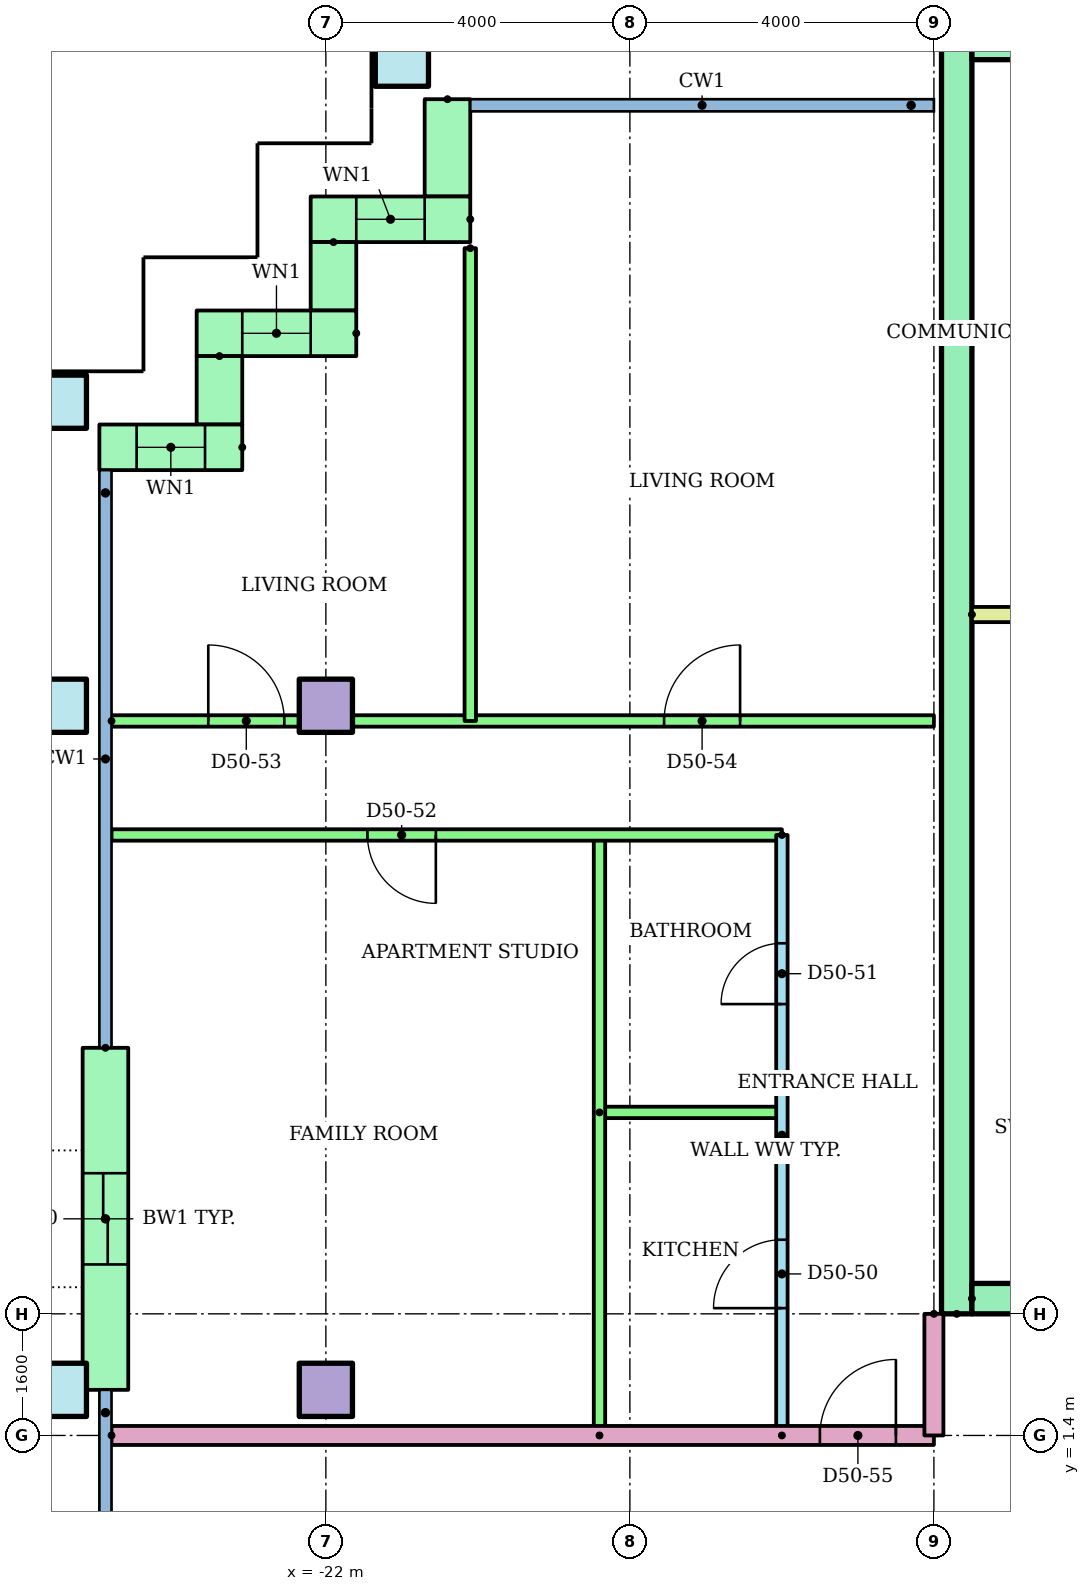
"""IFC4 building model, lengths in metres.
Left out: names, types, materials, properties, quantities, classifications, styles, units other than length and angle.
Written with IfcOpenShell. Run it as: python <this file> out.ifc"""

import sys

from ifc_helpers import new_model, si_unit, direction, frame, frame_2d, origin, origin_2d, place, context, subcontext, project, spatial, rectangle, hollow_rectangle, extrude, element, fill, save


model = new_model("IFC4")
c1 = context("Model", 3, precision=1e-05, world=origin(), true_north=direction((0.0, 1.0)))
c2 = subcontext(c1, "Body", "Model", "MODEL_VIEW")
j1 = project(units=[si_unit("LENGTHUNIT", "METRE"), si_unit("PLANEANGLEUNIT", "RADIAN")], contexts=[c1])
p1 = place(None, origin())
s1 = spatial("IfcSite", under=j1, at=p1, CompositionType="ELEMENT")
p2 = place(p1, origin())
s2 = spatial("IfcBuilding", under=s1, at=p2, CompositionType="ELEMENT")
p3 = place(p2, frame((0.0, 0.0, 190.9)))
s3 = spatial("IfcBuildingStorey", under=s2, at=p3, CompositionType="ELEMENT", Elevation=190.9)
p4 = place(p3, frame((-25.5, 2.0, 0.0)))
e1 = element("IfcColumn", 1, at=p4, inside=s3, PredefinedType="COLUMN", context=c2, shape_type="SweptSolid", body=[
    extrude(hollow_rectangle(XDim=0.7, YDim=0.7, WallThickness=0.036, at=origin_2d()), origin(), (0.0, 0.0, 1.0), 3.2),
])
p5 = place(p3, frame((-22.0, 2.0, 0.0)))
e2 = element("IfcColumn", 2, at=p5, inside=s3, PredefinedType="COLUMN", context=c2, shape_type="SweptSolid", body=[
    extrude(rectangle(XDim=0.7, YDim=0.7, at=origin_2d()), origin(), (0.0, 0.0, 1.0), 3.2),
])
p6 = place(p3, frame((-25.5, 11.0, 0.0)))
e3 = element("IfcColumn", 3, at=p6, inside=s3, PredefinedType="COLUMN", context=c2, shape_type="SweptSolid", body=[
    extrude(hollow_rectangle(XDim=0.7, YDim=0.7, WallThickness=0.036, at=origin_2d()), origin(), (0.0, 0.0, 1.0), 3.2),
])
p7 = place(p3, frame((-22.0, 11.0, 0.0)))
e4 = element("IfcColumn", 4, at=p7, inside=s3, PredefinedType="COLUMN", context=c2, shape_type="SweptSolid", body=[
    extrude(rectangle(XDim=0.7, YDim=0.7, at=origin_2d()), origin(), (0.0, 0.0, 1.0), 3.2),
])
for number, where in (
    (5, (-25.5, 15.0, 0.0)),
    (6, (-21.0, 19.5, 0.0)),
):
    element("IfcColumn", number, at=place(p3, frame(where)), inside=s3, PredefinedType="COLUMN", context=c2, shape_type="SweptSolid", body=[
        extrude(hollow_rectangle(XDim=0.7, YDim=0.7, WallThickness=0.036, at=origin_2d()), origin(), (0.0, 0.0, 1.0), 3.2),
    ])
p8 = place(p3, frame((-20.4, 18.98, 0.0), z_axis=(0.0, 0.0, 1.0), x_axis=(0.0, -1.0, 0.0)))
e7 = element("IfcWall", 7, at=p8, inside=s3, PredefinedType="STANDARD", context=c2, shape_type="SweptSolid", body=[
    extrude(rectangle(XDim=1.28, YDim=0.6, at=frame_2d((0.64, 0.0))), origin(), (0.0, 0.0, 1.0), 2.8),
])
p9 = place(p3, frame((-20.1, 17.4, 0.0), z_axis=(0.0, 0.0, 1.0), x_axis=(-1.0, 0.0, 0.0)))
e8 = element("IfcWall", 8, at=p9, inside=s3, PredefinedType="STANDARD", context=c2, shape_type="SweptSolid", body=[
    extrude(rectangle(XDim=2.1, YDim=0.6, at=frame_2d((1.05, 0.0))), origin(), (0.0, 0.0, 1.0), 2.8),
])
p10 = place(p9, frame((0.6, 0.0, 0.9)))
e9 = element("IfcOpeningElement", 9, at=p10, cuts=e8, PredefinedType="OPENING", context=c2, shape_type="SweptSolid", body=[
    extrude(rectangle(XDim=0.9, YDim=1.5, at=frame_2d((0.45, 0.75))), frame((0.0, 0.31, 0.0), z_axis=(0.0, -1.0, 0.0), x_axis=(1.0, 0.0, 0.0)), (0.0, 0.0, 1.0), 0.62),
])
p11 = place(p3, frame((-21.9, 17.1, 0.0), z_axis=(0.0, 0.0, 1.0), x_axis=(0.0, -1.0, 0.0)))
e10 = element("IfcWall", 10, at=p11, inside=s3, PredefinedType="STANDARD", context=c2, shape_type="SweptSolid", body=[
    extrude(rectangle(XDim=0.9, YDim=0.6, at=frame_2d((0.45, 0.0))), origin(), (0.0, 0.0, 1.0), 2.8),
])
p12 = place(p3, frame((-21.6, 15.9, 0.0), z_axis=(0.0, 0.0, 1.0), x_axis=(-1.0, 0.0, 0.0)))
e11 = element("IfcWall", 11, at=p12, inside=s3, PredefinedType="STANDARD", context=c2, shape_type="SweptSolid", body=[
    extrude(rectangle(XDim=2.1, YDim=0.6, at=frame_2d((1.05, 0.0))), origin(), (0.0, 0.0, 1.0), 2.8),
])
p13 = place(p12, frame((0.6, 0.0, 0.9)))
e12 = element("IfcOpeningElement", 12, at=p13, cuts=e11, PredefinedType="OPENING", context=c2, shape_type="SweptSolid", body=[
    extrude(rectangle(XDim=0.9, YDim=1.5, at=frame_2d((0.45, 0.75))), frame((0.0, 0.31, 0.0), z_axis=(0.0, -1.0, 0.0), x_axis=(1.0, 0.0, 0.0)), (0.0, 0.0, 1.0), 0.62),
])
p14 = place(p3, frame((-23.4, 15.6, 0.0), z_axis=(0.0, 0.0, 1.0), x_axis=(0.0, -1.0, 0.0)))
e13 = element("IfcWall", 13, at=p14, inside=s3, PredefinedType="STANDARD", context=c2, shape_type="SweptSolid", body=[
    extrude(rectangle(XDim=0.9, YDim=0.6, at=frame_2d((0.45, 0.0))), origin(), (0.0, 0.0, 1.0), 2.8),
])
p15 = place(p3, frame((-23.1, 14.4, 0.0), z_axis=(0.0, 0.0, 1.0), x_axis=(-1.0, 0.0, 0.0)))
e14 = element("IfcWall", 14, at=p15, inside=s3, PredefinedType="STANDARD", context=c2, shape_type="SweptSolid", body=[
    extrude(rectangle(XDim=1.88, YDim=0.6, at=frame_2d((0.94, 0.0))), origin(), (0.0, 0.0, 1.0), 2.8),
])
p16 = place(p15, frame((0.49, 0.0, 0.9)))
e15 = element("IfcOpeningElement", 15, at=p16, cuts=e14, PredefinedType="OPENING", context=c2, shape_type="SweptSolid", body=[
    extrude(rectangle(XDim=0.9, YDim=1.5, at=frame_2d((0.45, 0.75))), frame((0.0, 0.31, 0.0), z_axis=(0.0, -1.0, 0.0), x_axis=(1.0, 0.0, 0.0)), (0.0, 0.0, 1.0), 0.62),
])
p17 = place(p3, frame((-24.9, 6.5, 0.0), z_axis=(0.0, 0.0, 1.0), x_axis=(0.0, -1.0, 0.0)))
e16 = element("IfcWall", 16, at=p17, inside=s3, PredefinedType="STANDARD", context=c2, shape_type="SweptSolid", body=[
    extrude(rectangle(XDim=4.5, YDim=0.6, at=frame_2d((2.25, 0.0))), origin(), (0.0, 0.0, 1.0), 2.8),
])
p18 = place(p17, frame((1.65, 0.0, 0.0)))
e17 = element("IfcOpeningElement", 17, at=p18, cuts=e16, PredefinedType="OPENING", context=c2, shape_type="SweptSolid", body=[
    extrude(rectangle(XDim=1.2, YDim=2.1, at=frame_2d((0.6, 1.05))), frame((0.0, 0.31, 0.0), z_axis=(0.0, -1.0, 0.0), x_axis=(1.0, 0.0, 0.0)), (0.0, 0.0, 1.0), 0.62),
])
p19 = place(p3, frame((-13.7, 3.0, 0.0), z_axis=(0.0, 0.0, 1.0), x_axis=(0.0, 1.0, 0.0)))
e18 = element("IfcWall", 18, at=p19, inside=s3, PredefinedType="SHEAR", context=c2, shape_type="SweptSolid", body=[
    extrude(rectangle(XDim=17.0, YDim=0.4, at=frame_2d((8.5, 0.0))), origin(), (0.0, 0.0, 1.0), 2.8),
])
p20 = place(p3, frame((-13.5, 19.7, 0.0)))
e19 = element("IfcWall", 19, at=p20, inside=s3, PredefinedType="SHEAR", context=c2, shape_type="SweptSolid", body=[
    extrude(rectangle(XDim=27.0, YDim=0.4, at=frame_2d((13.5, 0.0))), origin(), (0.0, 0.0, 1.0), 2.8),
])
p21 = place(p3, frame((-13.5, 3.2, 0.0)))
e20 = element("IfcWall", 20, at=p21, inside=s3, PredefinedType="SHEAR", context=c2, shape_type="SweptSolid", body=[
    extrude(rectangle(XDim=27.0, YDim=0.4, at=frame_2d((13.5, 0.0))), origin(), (0.0, 0.0, 1.0), 2.8),
])
p22 = place(p21, frame((22.083, 0.0, 0.0)))
e21 = element("IfcOpeningElement", 21, at=p22, cuts=e20, PredefinedType="OPENING", context=c2, shape_type="SweptSolid", body=[
    extrude(rectangle(XDim=1.1, YDim=2.1, at=frame_2d((0.55, 1.05))), frame((0.0, 0.21, 0.0), z_axis=(0.0, -1.0, 0.0), x_axis=(1.0, 0.0, 0.0)), (0.0, 0.0, 1.0), 0.42),
])
p23 = place(p21, frame((25.128, 0.0, 0.0)))
e22 = element("IfcOpeningElement", 22, at=p23, cuts=e20, PredefinedType="OPENING", context=c2, shape_type="SweptSolid", body=[
    extrude(rectangle(XDim=1.1, YDim=2.1, at=frame_2d((0.55, 1.05))), frame((0.0, 0.21, 0.0), z_axis=(0.0, -1.0, 0.0), x_axis=(1.0, 0.0, 0.0)), (0.0, 0.0, 1.0), 0.42),
])
p24 = place(p21, frame((12.6, 0.0, 0.0)))
e23 = element("IfcOpeningElement", 23, at=p24, cuts=e20, PredefinedType="OPENING", context=c2, shape_type="SweptSolid", body=[
    extrude(rectangle(XDim=1.8, YDim=2.1, at=frame_2d((0.9, 1.05))), frame((0.0, 0.21, 0.0), z_axis=(0.0, -1.0, 0.0), x_axis=(1.0, 0.0, 0.0)), (0.0, 0.0, 1.0), 0.42),
])
p25 = place(p3, frame((-13.5, 12.2, 0.0)))
e24 = element("IfcWall", 24, at=p25, inside=s3, PredefinedType="PARTITIONING", context=c2, shape_type="SweptSolid", body=[
    extrude(rectangle(XDim=3.9, YDim=0.2, at=frame_2d((1.95, 0.0))), origin(), (0.0, 0.0, 1.0), 2.8),
])
p26 = place(p3, frame((-16.0, 1.4, 0.0), z_axis=(0.0, 0.0, 1.0), x_axis=(0.0, 1.0, 0.0)))
e25 = element("IfcWall", 25, at=p26, inside=s3, PredefinedType="PARTITIONING", context=c2, shape_type="SweptSolid", body=[
    extrude(rectangle(XDim=7.9, YDim=0.15, at=frame_2d((3.95, 0.0))), origin(), (0.0, 0.0, 1.0), 2.4),
])
p27 = place(p26, frame((1.675, 0.0, 0.0)))
e26 = element("IfcOpeningElement", 26, at=p27, cuts=e25, PredefinedType="OPENING", context=c2, shape_type="SweptSolid", body=[
    extrude(rectangle(XDim=0.9, YDim=2.1, at=frame_2d((0.45, 1.05))), frame((0.0, 0.085, 0.0), z_axis=(0.0, -1.0, 0.0), x_axis=(1.0, 0.0, 0.0)), (0.0, 0.0, 1.0), 0.17),
])
p28 = place(p26, frame((5.675, 0.0, 0.0)))
e27 = element("IfcOpeningElement", 27, at=p28, cuts=e25, PredefinedType="OPENING", context=c2, shape_type="SweptSolid", body=[
    extrude(rectangle(XDim=0.8, YDim=2.1, at=frame_2d((0.4, 1.05))), frame((0.0, 0.085, 0.0), z_axis=(0.0, -1.0, 0.0), x_axis=(1.0, 0.0, 0.0)), (0.0, 0.0, 1.0), 0.17),
])
p29 = place(p3, frame((-18.4, 5.65, 0.0)))
e28 = element("IfcWall", 28, at=p29, inside=s3, PredefinedType="PARTITIONING", context=c2, shape_type="SweptSolid", body=[
    extrude(rectangle(XDim=2.4, YDim=0.15, at=frame_2d((1.2, 0.0))), origin(), (0.0, 0.0, 1.0), 2.4),
])
p30 = place(p3, frame((-18.4, 1.4, 0.0), z_axis=(0.0, 0.0, 1.0), x_axis=(0.0, 1.0, 0.0)))
e29 = element("IfcWall", 29, at=p30, inside=s3, PredefinedType="PARTITIONING", context=c2, shape_type="SweptSolid", body=[
    extrude(rectangle(XDim=7.9, YDim=0.15, at=frame_2d((3.95, 0.0))), origin(), (0.0, 0.0, 1.0), 2.4),
])
p31 = place(p3, frame((-16.0, 9.3, 0.0), z_axis=(0.0, 0.0, 1.0), x_axis=(-1.0, 0.0, 0.0)))
e30 = element("IfcWall", 30, at=p31, inside=s3, PredefinedType="PARTITIONING", context=c2, shape_type="SweptSolid", body=[
    extrude(rectangle(XDim=8.82, YDim=0.15, at=frame_2d((4.41, 0.0))), origin(), (0.0, 0.0, 1.0), 2.4),
])
p32 = place(p31, frame((4.553, 0.0, 0.0)))
e31 = element("IfcOpeningElement", 31, at=p32, cuts=e30, PredefinedType="OPENING", context=c2, shape_type="SweptSolid", body=[
    extrude(rectangle(XDim=0.9, YDim=2.1, at=frame_2d((0.45, 1.05))), frame((0.0, 0.085, 0.0), z_axis=(0.0, -1.0, 0.0), x_axis=(1.0, 0.0, 0.0)), (0.0, 0.0, 1.0), 0.17),
])
p33 = place(p3, frame((-24.82, 10.8, 0.0)))
e32 = element("IfcWall", 32, at=p33, inside=s3, PredefinedType="PARTITIONING", context=c2, shape_type="SweptSolid", body=[
    extrude(rectangle(XDim=10.82, YDim=0.15, at=frame_2d((5.41, 0.0))), origin(), (0.0, 0.0, 1.0), 2.4),
])
p34 = place(p33, frame((1.273, 0.0, 0.0)))
e33 = element("IfcOpeningElement", 33, at=p34, cuts=e32, PredefinedType="OPENING", context=c2, shape_type="SweptSolid", body=[
    extrude(rectangle(XDim=1.0, YDim=2.1, at=frame_2d((0.5, 1.05))), frame((0.0, 0.085, 0.0), z_axis=(0.0, -1.0, 0.0), x_axis=(1.0, 0.0, 0.0)), (0.0, 0.0, 1.0), 0.17),
])
p35 = place(p33, frame((7.27, 0.0, 0.0)))
e34 = element("IfcOpeningElement", 34, at=p35, cuts=e32, PredefinedType="OPENING", context=c2, shape_type="SweptSolid", body=[
    extrude(rectangle(XDim=1.0, YDim=2.1, at=frame_2d((0.5, 1.05))), frame((0.0, 0.085, 0.0), z_axis=(0.0, -1.0, 0.0), x_axis=(1.0, 0.0, 0.0)), (0.0, 0.0, 1.0), 0.17),
])
p36 = place(p3, frame((-20.1, 17.02, 0.0), z_axis=(0.0, 0.0, 1.0), x_axis=(0.0, -1.0, 0.0)))
e35 = element("IfcWall", 35, at=p36, inside=s3, PredefinedType="PARTITIONING", context=c2, shape_type="SweptSolid", body=[
    extrude(rectangle(XDim=6.22, YDim=0.15, at=frame_2d((3.11, 0.0))), origin(), (0.0, 0.0, 1.0), 2.4),
])
p37 = place(p3, frame((-24.82, 1.4, 0.0)))
e36 = element("IfcWall", 36, at=p37, inside=s3, PredefinedType="PARTITIONING", context=c2, shape_type="SweptSolid", body=[
    extrude(rectangle(XDim=10.82, YDim=0.25, at=frame_2d((5.41, 0.0))), origin(), (0.0, 0.0, 1.0), 2.4),
])
p38 = place(p37, frame((9.32, 0.0, 0.0)))
e37 = element("IfcOpeningElement", 37, at=p38, cuts=e36, PredefinedType="OPENING", context=c2, shape_type="SweptSolid", body=[
    extrude(rectangle(XDim=1.0, YDim=2.1, at=frame_2d((0.5, 1.05))), frame((0.0, 0.135, 0.0), z_axis=(0.0, -1.0, 0.0), x_axis=(1.0, 0.0, 0.0)), (0.0, 0.0, 1.0), 0.27),
])
p39 = place(p3, frame((-14.0, 3.0, 0.0), z_axis=(0.0, 0.0, 1.0), x_axis=(0.0, -1.0, 0.0)))
e38 = element("IfcWall", 38, at=p39, inside=s3, PredefinedType="PARTITIONING", context=c2, shape_type="SweptSolid", body=[
    extrude(rectangle(XDim=1.6, YDim=0.25, at=frame_2d((0.8, 0.0))), origin(), (0.0, 0.0, 1.0), 2.4),
])
p40 = place(p10, origin())
e39 = element("IfcWindow", 39, at=p40, inside=s3, PartitioningType="SINGLE_PANEL", PredefinedType="WINDOW", context=c2, shape_type="SweptSolid", body=[
    extrude(rectangle(XDim=0.9, YDim=1.5, at=frame_2d((0.45, 0.75))), frame((0.0, 0.03, 0.0), z_axis=(0.0, -1.0, 0.0), x_axis=(1.0, 0.0, 0.0)), (0.0, 0.0, 1.0), 0.06),
])
fill(e9, e39)
p41 = place(p13, origin())
e40 = element("IfcWindow", 40, at=p41, inside=s3, PartitioningType="SINGLE_PANEL", PredefinedType="WINDOW", context=c2, shape_type="SweptSolid", body=[
    extrude(rectangle(XDim=0.9, YDim=1.5, at=frame_2d((0.45, 0.75))), frame((0.0, 0.03, 0.0), z_axis=(0.0, -1.0, 0.0), x_axis=(1.0, 0.0, 0.0)), (0.0, 0.0, 1.0), 0.06),
])
fill(e12, e40)
p42 = place(p16, origin())
e41 = element("IfcWindow", 41, at=p42, inside=s3, PartitioningType="SINGLE_PANEL", PredefinedType="WINDOW", context=c2, shape_type="SweptSolid", body=[
    extrude(rectangle(XDim=0.9, YDim=1.5, at=frame_2d((0.45, 0.75))), frame((0.0, 0.03, 0.0), z_axis=(0.0, -1.0, 0.0), x_axis=(1.0, 0.0, 0.0)), (0.0, 0.0, 1.0), 0.06),
])
fill(e15, e41)
p43 = place(p27, origin())
e42 = element("IfcDoor", 42, at=p43, inside=s3, OperationType="SINGLE_SWING_LEFT", PredefinedType="DOOR", context=c2, shape_type="SweptSolid", body=[
    extrude(rectangle(XDim=0.9, YDim=2.1, at=frame_2d((0.45, 1.05))), frame((0.0, 0.025, 0.0), z_axis=(0.0, -1.0, 0.0), x_axis=(1.0, 0.0, 0.0)), (0.0, 0.0, 1.0), 0.05),
])
fill(e26, e42)
p44 = place(p28, origin())
e43 = element("IfcDoor", 43, at=p44, inside=s3, OperationType="SINGLE_SWING_LEFT", PredefinedType="DOOR", context=c2, shape_type="SweptSolid", body=[
    extrude(rectangle(XDim=0.8, YDim=2.1, at=frame_2d((0.4, 1.05))), frame((0.0, 0.025, 0.0), z_axis=(0.0, -1.0, 0.0), x_axis=(1.0, 0.0, 0.0)), (0.0, 0.0, 1.0), 0.05),
])
fill(e27, e43)
p45 = place(p32, origin())
e44 = element("IfcDoor", 44, at=p45, inside=s3, OperationType="SINGLE_SWING_LEFT", PredefinedType="DOOR", context=c2, shape_type="SweptSolid", body=[
    extrude(rectangle(XDim=0.9, YDim=2.1, at=frame_2d((0.45, 1.05))), frame((0.0, 0.025, 0.0), z_axis=(0.0, -1.0, 0.0), x_axis=(1.0, 0.0, 0.0)), (0.0, 0.0, 1.0), 0.05),
])
fill(e31, e44)
p46 = place(p34, origin())
e45 = element("IfcDoor", 45, at=p46, inside=s3, OperationType="SINGLE_SWING_LEFT", PredefinedType="DOOR", context=c2, shape_type="SweptSolid", body=[
    extrude(rectangle(XDim=1.0, YDim=2.1, at=frame_2d((0.5, 1.05))), frame((0.0, 0.025, 0.0), z_axis=(0.0, -1.0, 0.0), x_axis=(1.0, 0.0, 0.0)), (0.0, 0.0, 1.0), 0.05),
])
fill(e33, e45)
p47 = place(p35, origin())
e46 = element("IfcDoor", 46, at=p47, inside=s3, OperationType="SINGLE_SWING_RIGHT", PredefinedType="DOOR", context=c2, shape_type="SweptSolid", body=[
    extrude(rectangle(XDim=1.0, YDim=2.1, at=frame_2d((0.5, 1.05))), frame((0.0, 0.025, 0.0), z_axis=(0.0, -1.0, 0.0), x_axis=(1.0, 0.0, 0.0)), (0.0, 0.0, 1.0), 0.05),
])
fill(e34, e46)
p48 = place(p38, origin())
e47 = element("IfcDoor", 47, at=p48, inside=s3, OperationType="SINGLE_SWING_RIGHT", PredefinedType="DOOR", context=c2, shape_type="SweptSolid", body=[
    extrude(rectangle(XDim=1.0, YDim=2.1, at=frame_2d((0.5, 1.05))), frame((0.0, 0.025, 0.0), z_axis=(0.0, -1.0, 0.0), x_axis=(1.0, 0.0, 0.0)), (0.0, 0.0, 1.0), 0.05),
])
fill(e37, e47)
p49 = place(p18, origin())
e48 = element("IfcDoor", 48, at=p49, inside=s3, OperationType="SLIDING_TO_LEFT", PredefinedType="DOOR", context=c2, shape_type="SweptSolid", body=[
    extrude(rectangle(XDim=1.2, YDim=2.1, at=frame_2d((0.6, 1.05))), frame((0.0, 0.025, 0.0), z_axis=(0.0, -1.0, 0.0), x_axis=(1.0, 0.0, 0.0)), (0.0, 0.0, 1.0), 0.05),
])
fill(e17, e48)
save(model, sys.argv[1])
